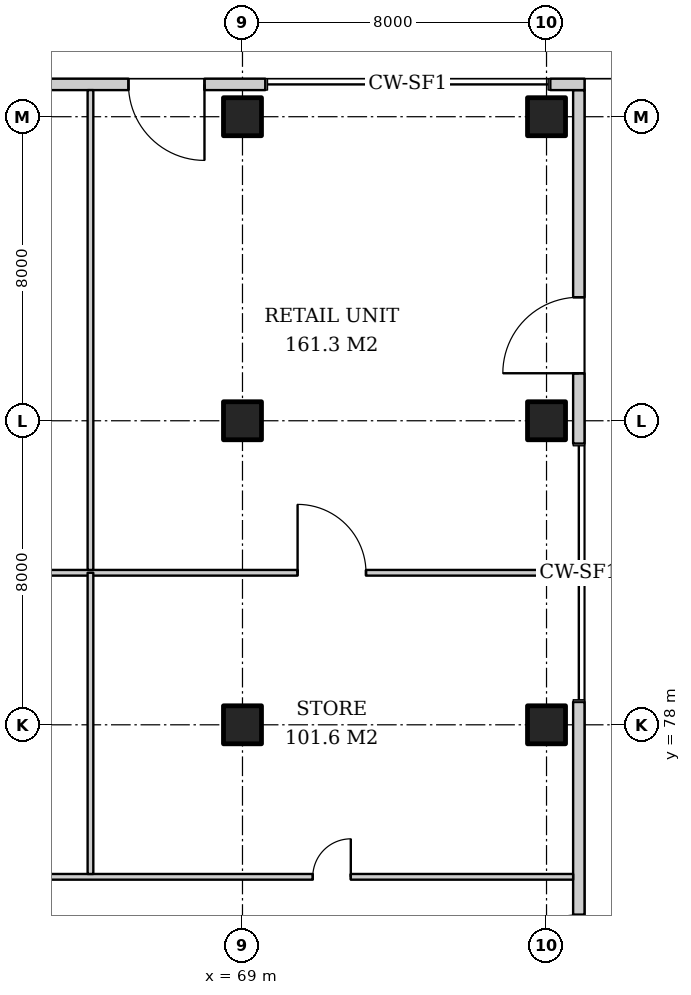
"""IFC4 building model, lengths in metres.
Left out: names, types, materials, properties, quantities, classifications, styles, units other than length and angle.
Written with IfcOpenShell. Run it as: python <this file> out.ifc"""

import sys

from ifc_helpers import new_model, si_unit, direction, frame, frame_2d, origin, origin_2d, place, context, subcontext, project, spatial, rectangle, extrude, element, fill, save


model = new_model("IFC4")
c1 = context("Model", 3, precision=1e-05, world=origin(), true_north=direction((0.0, 1.0)))
c2 = subcontext(c1, "Body", "Model", "MODEL_VIEW")
j1 = project(units=[si_unit("LENGTHUNIT", "METRE"), si_unit("PLANEANGLEUNIT", "RADIAN")], contexts=[c1])
p1 = place(None, origin())
s1 = spatial("IfcSite", under=j1, at=p1, CompositionType="ELEMENT")
p2 = place(p1, origin())
s2 = spatial("IfcBuilding", under=s1, at=p2, CompositionType="ELEMENT")
p3 = place(p2, origin())
s3 = spatial("IfcBuildingStorey", under=s2, at=p3, CompositionType="ELEMENT", Elevation=0.0)
for number, where, z_axis, x_axis in (
    (1, (69.0, 78.0, 0.0), (0.0, 0.0, 1.0), (1.0, 0.0, 0.0)),
    (2, (69.0, 86.0, 0.0), (0.0, 0.0, 1.0), (1.0, 0.0, 0.0)),
    (3, (69.0, 94.0, 0.0), (0.0, 0.0, 1.0), (1.0, 0.0, 0.0)),
    (4, (77.0, 78.0, 0.0), (0.0, 0.0, 1.0), (1.0, 0.0, 0.0)),
    (5, (77.0, 86.0, 0.0), (0.0, 0.0, 1.0), (1.0, 0.0, 0.0)),
    (6, (77.0, 94.0, 0.0), (0.0, 0.0, 1.0), (1.0, 0.0, 0.0)),
):
    element("IfcColumn", number, at=place(p3, frame(where, z_axis=z_axis, x_axis=x_axis)), inside=s3, PredefinedType="COLUMN", context=c2, shape_type="SweptSolid", body=[
        extrude(rectangle(XDim=1.0, YDim=1.0, at=origin_2d()), origin(), (0.0, 0.0, 1.0), 6.0),
    ])
p4 = place(p3, frame((77.85, 61.4, 0.0), z_axis=(0.0, 0.0, 1.0), x_axis=(0.0, 1.0, 0.0)))
e7 = element("IfcWall", 7, at=p4, inside=s3, PredefinedType="SOLIDWALL", context=c2, shape_type="SweptSolid", body=[
    extrude(rectangle(XDim=17.2, YDim=0.3, at=frame_2d((8.6, 0.0))), origin(), (0.0, 0.0, 1.0), 5.7),
])
p5 = place(p4, frame((1.6, 0.0, 0.0)))
e8 = element("IfcOpeningElement", 8, at=p5, cuts=e7, PredefinedType="OPENING", context=c2, shape_type="SweptSolid", body=[
    extrude(rectangle(XDim=2.0, YDim=2.7, at=frame_2d((1.0, 1.35))), frame((0.0, 0.16, 0.0), z_axis=(0.0, -1.0, 0.0), x_axis=(1.0, 0.0, 0.0)), (0.0, 0.0, 1.0), 0.32),
])
p6 = place(p4, frame((9.6, 0.0, 0.0)))
e9 = element("IfcOpeningElement", 9, at=p6, cuts=e7, PredefinedType="OPENING", context=c2, shape_type="SweptSolid", body=[
    extrude(rectangle(XDim=2.0, YDim=2.7, at=frame_2d((1.0, 1.35))), frame((0.0, 0.16, 0.0), z_axis=(0.0, -1.0, 0.0), x_axis=(1.0, 0.0, 0.0)), (0.0, 0.0, 1.0), 0.32),
])
p7 = place(p3, frame((77.85, 85.4, 0.0), z_axis=(0.0, 0.0, 1.0), x_axis=(0.0, 1.0, 0.0)))
e10 = element("IfcWall", 10, at=p7, inside=s3, PredefinedType="SOLIDWALL", context=c2, shape_type="SweptSolid", body=[
    extrude(rectangle(XDim=9.3, YDim=0.3, at=frame_2d((4.65, 0.0))), origin(), (0.0, 0.0, 1.0), 5.7),
])
p8 = place(p7, frame((1.85, 0.0, 0.0)))
e11 = element("IfcOpeningElement", 11, at=p8, cuts=e10, PredefinedType="OPENING", context=c2, shape_type="SweptSolid", body=[
    extrude(rectangle(XDim=2.0, YDim=2.7, at=frame_2d((1.0, 1.35))), frame((0.0, 0.16, 0.0), z_axis=(0.0, -1.0, 0.0), x_axis=(1.0, 0.0, 0.0)), (0.0, 0.0, 1.0), 0.32),
])
p9 = place(p3, frame((78.0, 94.85, 0.0), z_axis=(0.0, 0.0, 1.0), x_axis=(-1.0, 0.0, 0.0)))
e12 = element("IfcWall", 12, at=p9, inside=s3, PredefinedType="SOLIDWALL", context=c2, shape_type="SweptSolid", body=[
    extrude(rectangle(XDim=0.9, YDim=0.3, at=frame_2d((0.45, 0.0))), origin(), (0.0, 0.0, 1.0), 5.7),
])
p10 = place(p3, frame((69.6, 94.85, 0.0), z_axis=(0.0, 0.0, 1.0), x_axis=(-1.0, 0.0, 0.0)))
e13 = element("IfcWall", 13, at=p10, inside=s3, PredefinedType="SOLIDWALL", context=c2, shape_type="SweptSolid", body=[
    extrude(rectangle(XDim=9.2, YDim=0.3, at=frame_2d((4.6, 0.0))), origin(), (0.0, 0.0, 1.0), 5.7),
])
p11 = place(p10, frame((1.6, 0.0, 0.0)))
e14 = element("IfcOpeningElement", 14, at=p11, cuts=e13, PredefinedType="OPENING", context=c2, shape_type="SweptSolid", body=[
    extrude(rectangle(XDim=2.0, YDim=2.7, at=frame_2d((1.0, 1.35))), frame((0.0, 0.16, 0.0), z_axis=(0.0, -1.0, 0.0), x_axis=(1.0, 0.0, 0.0)), (0.0, 0.0, 1.0), 0.32),
])
p12 = place(p3, frame((16.925, 82.0, 0.0), z_axis=(0.0, 0.0, 1.0), x_axis=(1.0, 0.0, 0.0)))
e15 = element("IfcWall", 15, at=p12, inside=s3, PredefinedType="PARTITIONING", context=c2, shape_type="SweptSolid", body=[
    extrude(rectangle(XDim=60.775, YDim=0.15, at=frame_2d((30.387, 0.0))), origin(), (0.0, 0.0, 1.0), 5.7),
])
p13 = place(p12, frame((7.175, 0.0, 0.0)))
e16 = element("IfcOpeningElement", 16, at=p13, cuts=e15, PredefinedType="OPENING", context=c2, shape_type="SweptSolid", body=[
    extrude(rectangle(XDim=1.8, YDim=2.4, at=frame_2d((0.9, 1.2))), frame((0.0, 0.085, 0.0), z_axis=(0.0, -1.0, 0.0), x_axis=(1.0, 0.0, 0.0)), (0.0, 0.0, 1.0), 0.17),
])
p14 = place(p12, frame((23.175, 0.0, 0.0)))
e17 = element("IfcOpeningElement", 17, at=p14, cuts=e15, PredefinedType="OPENING", context=c2, shape_type="SweptSolid", body=[
    extrude(rectangle(XDim=1.8, YDim=2.4, at=frame_2d((0.9, 1.2))), frame((0.0, 0.085, 0.0), z_axis=(0.0, -1.0, 0.0), x_axis=(1.0, 0.0, 0.0)), (0.0, 0.0, 1.0), 0.17),
])
p15 = place(p12, frame((39.175, 0.0, 0.0)))
e18 = element("IfcOpeningElement", 18, at=p15, cuts=e15, PredefinedType="OPENING", context=c2, shape_type="SweptSolid", body=[
    extrude(rectangle(XDim=1.8, YDim=2.4, at=frame_2d((0.9, 1.2))), frame((0.0, 0.085, 0.0), z_axis=(0.0, -1.0, 0.0), x_axis=(1.0, 0.0, 0.0)), (0.0, 0.0, 1.0), 0.17),
])
p16 = place(p12, frame((53.525, 0.0, 0.0)))
e19 = element("IfcOpeningElement", 19, at=p16, cuts=e15, PredefinedType="OPENING", context=c2, shape_type="SweptSolid", body=[
    extrude(rectangle(XDim=1.8, YDim=2.4, at=frame_2d((0.9, 1.2))), frame((0.0, 0.085, 0.0), z_axis=(0.0, -1.0, 0.0), x_axis=(1.0, 0.0, 0.0)), (0.0, 0.0, 1.0), 0.17),
])
p17 = place(p3, frame((65.0, 82.075, 0.0), z_axis=(0.0, 0.0, 1.0), x_axis=(0.0, 1.0, 0.0)))
e20 = element("IfcWall", 20, at=p17, inside=s3, PredefinedType="PARTITIONING", context=c2, shape_type="SweptSolid", body=[
    extrude(rectangle(XDim=12.625, YDim=0.15, at=frame_2d((6.312, 0.0))), origin(), (0.0, 0.0, 1.0), 4.2),
])
p18 = place(p3, frame((21.175, 74.0, 0.0), z_axis=(0.0, 0.0, 1.0), x_axis=(1.0, 0.0, 0.0)))
e21 = element("IfcWall", 21, at=p18, inside=s3, PredefinedType="PARTITIONING", context=c2, shape_type="SweptSolid", body=[
    extrude(rectangle(XDim=56.525, YDim=0.15, at=frame_2d((28.262, 0.0))), origin(), (0.0, 0.0, 1.0), 5.7),
])
p19 = place(p18, frame((5.05, 0.0, 0.0)))
e22 = element("IfcOpeningElement", 22, at=p19, cuts=e21, PredefinedType="OPENING", context=c2, shape_type="SweptSolid", body=[
    extrude(rectangle(XDim=1.8, YDim=2.4, at=frame_2d((0.9, 1.2))), frame((0.0, 0.085, 0.0), z_axis=(0.0, -1.0, 0.0), x_axis=(1.0, 0.0, 0.0)), (0.0, 0.0, 1.0), 0.17),
])
p20 = place(p18, frame((19.325, 0.0, 0.0)))
e23 = element("IfcOpeningElement", 23, at=p20, cuts=e21, PredefinedType="OPENING", context=c2, shape_type="SweptSolid", body=[
    extrude(rectangle(XDim=1.0, YDim=2.1, at=frame_2d((0.5, 1.05))), frame((0.0, 0.085, 0.0), z_axis=(0.0, -1.0, 0.0), x_axis=(1.0, 0.0, 0.0)), (0.0, 0.0, 1.0), 0.17),
])
p21 = place(p18, frame((29.925, 0.0, 0.0)))
e24 = element("IfcOpeningElement", 24, at=p21, cuts=e21, PredefinedType="OPENING", context=c2, shape_type="SweptSolid", body=[
    extrude(rectangle(XDim=1.8, YDim=2.4, at=frame_2d((0.9, 1.2))), frame((0.0, 0.085, 0.0), z_axis=(0.0, -1.0, 0.0), x_axis=(1.0, 0.0, 0.0)), (0.0, 0.0, 1.0), 0.17),
])
p22 = place(p18, frame((34.925, 0.0, 0.0)))
e25 = element("IfcOpeningElement", 25, at=p22, cuts=e21, PredefinedType="OPENING", context=c2, shape_type="SweptSolid", body=[
    extrude(rectangle(XDim=1.8, YDim=2.4, at=frame_2d((0.9, 1.2))), frame((0.0, 0.085, 0.0), z_axis=(0.0, -1.0, 0.0), x_axis=(1.0, 0.0, 0.0)), (0.0, 0.0, 1.0), 0.17),
])
p23 = place(p18, frame((39.925, 0.0, 0.0)))
e26 = element("IfcOpeningElement", 26, at=p23, cuts=e21, PredefinedType="OPENING", context=c2, shape_type="SweptSolid", body=[
    extrude(rectangle(XDim=1.8, YDim=2.4, at=frame_2d((0.9, 1.2))), frame((0.0, 0.085, 0.0), z_axis=(0.0, -1.0, 0.0), x_axis=(1.0, 0.0, 0.0)), (0.0, 0.0, 1.0), 0.17),
])
p24 = place(p18, frame((49.675, 0.0, 0.0)))
e27 = element("IfcOpeningElement", 27, at=p24, cuts=e21, PredefinedType="OPENING", context=c2, shape_type="SweptSolid", body=[
    extrude(rectangle(XDim=1.0, YDim=2.1, at=frame_2d((0.5, 1.05))), frame((0.0, 0.085, 0.0), z_axis=(0.0, -1.0, 0.0), x_axis=(1.0, 0.0, 0.0)), (0.0, 0.0, 1.0), 0.17),
])
p25 = place(p3, frame((65.0, 74.075, 0.0), z_axis=(0.0, 0.0, 1.0), x_axis=(0.0, 1.0, 0.0)))
e28 = element("IfcWall", 28, at=p25, inside=s3, PredefinedType="PARTITIONING", context=c2, shape_type="SweptSolid", body=[
    extrude(rectangle(XDim=7.925, YDim=0.15, at=frame_2d((3.962, 0.0))), origin(), (0.0, 0.0, 1.0), 5.7),
])
p26 = place(p8, origin())
e29 = element("IfcDoor", 29, at=p26, inside=s3, OperationType="DOUBLE_DOOR_SINGLE_SWING", PredefinedType="DOOR", context=c2, shape_type="SweptSolid", body=[
    extrude(rectangle(XDim=2.0, YDim=2.7, at=frame_2d((1.0, 1.35))), frame((0.0, 0.025, 0.0), z_axis=(0.0, -1.0, 0.0), x_axis=(1.0, 0.0, 0.0)), (0.0, 0.0, 1.0), 0.05),
])
fill(e11, e29)
p27 = place(p11, origin())
e30 = element("IfcDoor", 30, at=p27, inside=s3, OperationType="DOUBLE_DOOR_SINGLE_SWING", PredefinedType="DOOR", context=c2, shape_type="SweptSolid", body=[
    extrude(rectangle(XDim=2.0, YDim=2.7, at=frame_2d((1.0, 1.35))), frame((0.0, 0.025, 0.0), z_axis=(0.0, -1.0, 0.0), x_axis=(1.0, 0.0, 0.0)), (0.0, 0.0, 1.0), 0.05),
])
fill(e14, e30)
p28 = place(p16, origin())
e31 = element("IfcDoor", 31, at=p28, inside=s3, OperationType="DOUBLE_DOOR_SINGLE_SWING", PredefinedType="DOOR", context=c2, shape_type="SweptSolid", body=[
    extrude(rectangle(XDim=1.8, YDim=2.4, at=frame_2d((0.9, 1.2))), frame((0.0, 0.025, 0.0), z_axis=(0.0, -1.0, 0.0), x_axis=(1.0, 0.0, 0.0)), (0.0, 0.0, 1.0), 0.05),
])
fill(e19, e31)
p29 = place(p24, origin())
e32 = element("IfcDoor", 32, at=p29, inside=s3, OperationType="SINGLE_SWING_RIGHT", PredefinedType="DOOR", context=c2, shape_type="SweptSolid", body=[
    extrude(rectangle(XDim=1.0, YDim=2.1, at=frame_2d((0.5, 1.05))), frame((0.0, 0.025, 0.0), z_axis=(0.0, -1.0, 0.0), x_axis=(1.0, 0.0, 0.0)), (0.0, 0.0, 1.0), 0.05),
])
fill(e27, e32)
save(model, sys.argv[1])
